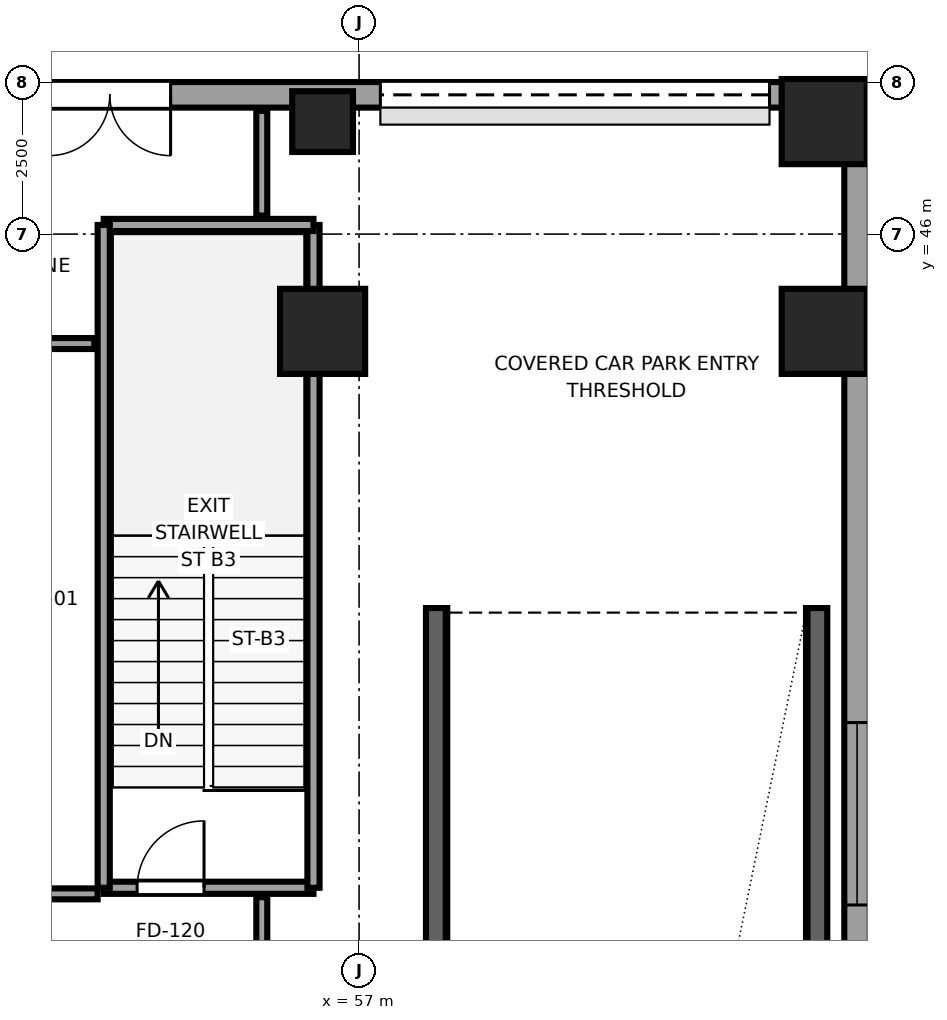
"""IFC4 building model, lengths in metres.
Left out: names, types, materials, properties, quantities, classifications, styles, units other than length and angle.
Written with IfcOpenShell. Run it as: python <this file> out.ifc"""

import sys

from ifc_helpers import new_model, si_unit, direction, frame, frame_2d, origin, origin_2d, place, context, subcontext, project, spatial, rectangle, extrude, source, transform, mapped, element, fill, save


model = new_model("IFC4")
c1 = context("Model", 3, precision=1e-05, world=origin(), true_north=direction((0.0, 1.0)))
c2 = subcontext(c1, "Body", "Model", "MODEL_VIEW")
j1 = project(units=[si_unit("LENGTHUNIT", "METRE"), si_unit("PLANEANGLEUNIT", "RADIAN")], contexts=[c1])
p1 = place(None, origin())
s1 = spatial("IfcSite", under=j1, at=p1, CompositionType="ELEMENT")
p2 = place(p1, origin())
s2 = spatial("IfcBuilding", under=s1, at=p2, CompositionType="ELEMENT")
p3 = place(p2, origin())
s3 = spatial("IfcBuildingStorey", under=s2, at=p3, CompositionType="ELEMENT", Elevation=0.0)
for number, where, z_axis, x_axis in (
    (1, (58.275, 10.85, 0.0), (0.0, 0.0, 1.0), (0.0, 1.0, 0.0)),
    (2, (64.525, 10.85, 0.0), (0.0, 0.0, 1.0), (0.0, 1.0, 0.0)),
):
    element("IfcWall", number, at=place(p3, frame(where, z_axis=z_axis, x_axis=x_axis)), inside=s3, PredefinedType="SHEAR", context=c2, shape_type="SweptSolid", body=[
        extrude(rectangle(XDim=29.0, YDim=0.35, at=frame_2d((14.5, 0.0))), origin(), (0.0, 0.0, 1.0), 1.25),
    ])
m1 = source(origin(), c2, "Body", "SweptSolid", [
    extrude(rectangle(XDim=1.4, YDim=1.4, at=origin_2d()), origin(), (0.0, 0.0, 1.0), 6.0),
])
for number, where, z_axis, x_axis in (
    (3, (64.65, 44.4, 0.0), (0.0, 0.0, 1.0), (1.0, 0.0, 0.0)),
    (4, (64.65, 47.85, 0.0), (0.0, 0.0, 1.0), (1.0, 0.0, 0.0)),
    (5, (56.4, 44.4, 0.0), (0.0, 0.0, 1.0), (1.0, 0.0, 0.0)),
):
    element("IfcColumn", number, at=place(p3, frame(where, z_axis=z_axis, x_axis=x_axis)), inside=s3, PredefinedType="COLUMN", context=c2, shape_type="MappedRepresentation", body=[
        mapped(m1, transform((0.0, 0.0, 0.0), x_axis=(1.0, 0.0, 0.0), y_axis=(0.0, 1.0, 0.0), z_axis=(0.0, 0.0, 1.0), scale=1.0)),
    ])
m2 = source(origin(), c2, "Body", "SweptSolid", [
    extrude(rectangle(XDim=1.0, YDim=1.0, at=origin_2d()), origin(), (0.0, 0.0, 1.0), 6.0),
])
p4 = place(p3, frame((56.4, 47.85, 0.0), z_axis=(0.0, 0.0, 1.0), x_axis=(1.0, 0.0, 0.0)))
e6 = element("IfcColumn", 6, at=p4, inside=s3, PredefinedType="COLUMN", context=c2, shape_type="MappedRepresentation", body=[
    mapped(m2, transform((0.0, 0.0, 0.0), x_axis=(1.0, 0.0, 0.0), y_axis=(0.0, 1.0, 0.0), z_axis=(0.0, 0.0, 1.0), scale=1.0)),
])
p5 = place(p3, frame((65.19, -2.29, 0.0), z_axis=(0.0, 0.0, 1.0), x_axis=(0.0, 1.0, 0.0)))
e7 = element("IfcWall", 7, at=p5, inside=s3, PredefinedType="SOLIDWALL", context=c2, shape_type="SweptSolid", body=[
    extrude(rectangle(XDim=50.58, YDim=0.42, at=frame_2d((25.29, 0.0))), origin(), (0.0, 0.0, 1.0), 5.74),
])
p6 = place(p5, frame((5.834, 0.0, 0.65)))
e8 = element("IfcOpeningElement", 8, at=p6, cuts=e7, PredefinedType="OPENING", context=c2, shape_type="SweptSolid", body=[
    extrude(rectangle(XDim=3.0, YDim=2.5, at=frame_2d((1.5, 1.25))), frame((0.0, 0.22, 0.0), z_axis=(0.0, -1.0, 0.0), x_axis=(1.0, 0.0, 0.0)), (0.0, 0.0, 1.0), 0.44),
])
p7 = place(p5, frame((14.262, 0.0, 0.65)))
e9 = element("IfcOpeningElement", 9, at=p7, cuts=e7, PredefinedType="OPENING", context=c2, shape_type="SweptSolid", body=[
    extrude(rectangle(XDim=3.0, YDim=2.5, at=frame_2d((1.5, 1.25))), frame((0.0, 0.22, 0.0), z_axis=(0.0, -1.0, 0.0), x_axis=(1.0, 0.0, 0.0)), (0.0, 0.0, 1.0), 0.44),
])
p8 = place(p5, frame((19.301, 0.0, 0.65)))
e10 = element("IfcOpeningElement", 10, at=p8, cuts=e7, PredefinedType="OPENING", context=c2, shape_type="SweptSolid", body=[
    extrude(rectangle(XDim=3.0, YDim=2.5, at=frame_2d((1.5, 1.25))), frame((0.0, 0.22, 0.0), z_axis=(0.0, -1.0, 0.0), x_axis=(1.0, 0.0, 0.0)), (0.0, 0.0, 1.0), 0.44),
])
p9 = place(p5, frame((22.74, 0.0, 0.65)))
e11 = element("IfcOpeningElement", 11, at=p9, cuts=e7, PredefinedType="OPENING", context=c2, shape_type="SweptSolid", body=[
    extrude(rectangle(XDim=3.0, YDim=2.5, at=frame_2d((1.5, 1.25))), frame((0.0, 0.22, 0.0), z_axis=(0.0, -1.0, 0.0), x_axis=(1.0, 0.0, 0.0)), (0.0, 0.0, 1.0), 0.44),
])
p10 = place(p5, frame((28.279, 0.0, 0.65)))
e12 = element("IfcOpeningElement", 12, at=p10, cuts=e7, PredefinedType="OPENING", context=c2, shape_type="SweptSolid", body=[
    extrude(rectangle(XDim=3.0, YDim=2.5, at=frame_2d((1.5, 1.25))), frame((0.0, 0.22, 0.0), z_axis=(0.0, -1.0, 0.0), x_axis=(1.0, 0.0, 0.0)), (0.0, 0.0, 1.0), 0.44),
])
p11 = place(p5, frame((37.257, 0.0, 0.65)))
e13 = element("IfcOpeningElement", 13, at=p11, cuts=e7, PredefinedType="OPENING", context=c2, shape_type="SweptSolid", body=[
    extrude(rectangle(XDim=3.0, YDim=2.5, at=frame_2d((1.5, 1.25))), frame((0.0, 0.22, 0.0), z_axis=(0.0, -1.0, 0.0), x_axis=(1.0, 0.0, 0.0)), (0.0, 0.0, 1.0), 0.44),
])
p12 = place(p3, frame((65.19, 48.29, 0.0), z_axis=(0.0, 0.0, 1.0), x_axis=(-1.0, 0.0, 0.0)))
e14 = element("IfcWall", 14, at=p12, inside=s3, PredefinedType="SOLIDWALL", context=c2, shape_type="SweptSolid", body=[
    extrude(rectangle(XDim=73.38, YDim=0.42, at=frame_2d((36.69, 0.0))), origin(), (0.0, 0.0, 1.0), 5.74),
])
p13 = place(p12, frame((7.84, 0.0, 0.0), z_axis=(0.0, 0.0, 1.0), x_axis=(-1.0, 0.0, 0.0)))
e15 = element("IfcOpeningElement", 15, at=p13, cuts=e14, PredefinedType="OPENING", context=c2, shape_type="SweptSolid", body=[
    extrude(rectangle(XDim=6.4, YDim=3.2, at=frame_2d((3.2, 1.6))), frame((0.0, 0.22, 0.0), z_axis=(0.0, -1.0, 0.0), x_axis=(1.0, 0.0, 0.0)), (0.0, 0.0, 1.0), 0.44),
])
p14 = place(p12, frame((13.29, 0.0, 0.0), z_axis=(0.0, 0.0, 1.0), x_axis=(-1.0, 0.0, 0.0)))
e16 = element("IfcOpeningElement", 16, at=p14, cuts=e14, PredefinedType="OPENING", context=c2, shape_type="SweptSolid", body=[
    extrude(rectangle(XDim=2.0, YDim=2.25, at=frame_2d((1.0, 1.125))), frame((0.0, 0.22, 0.0), z_axis=(0.0, -1.0, 0.0), x_axis=(1.0, 0.0, 0.0)), (0.0, 0.0, 1.0), 0.44),
])
p15 = place(p12, frame((20.59, 0.0, 0.0), z_axis=(0.0, 0.0, 1.0), x_axis=(-1.0, 0.0, 0.0)))
e17 = element("IfcOpeningElement", 17, at=p15, cuts=e14, PredefinedType="OPENING", context=c2, shape_type="SweptSolid", body=[
    extrude(rectangle(XDim=2.0, YDim=2.25, at=frame_2d((1.0, 1.125))), frame((0.0, 0.22, 0.0), z_axis=(0.0, -1.0, 0.0), x_axis=(1.0, 0.0, 0.0)), (0.0, 0.0, 1.0), 0.44),
])
p16 = place(p12, frame((51.99, 0.0, 0.0), z_axis=(0.0, 0.0, 1.0), x_axis=(-1.0, 0.0, 0.0)))
e18 = element("IfcOpeningElement", 18, at=p16, cuts=e14, PredefinedType="OPENING", context=c2, shape_type="SweptSolid", body=[
    extrude(rectangle(XDim=2.0, YDim=2.25, at=frame_2d((1.0, 1.125))), frame((0.0, 0.22, 0.0), z_axis=(0.0, -1.0, 0.0), x_axis=(1.0, 0.0, 0.0)), (0.0, 0.0, 1.0), 0.44),
])
p17 = place(p12, frame((69.99, 0.0, 0.0), z_axis=(0.0, 0.0, 1.0), x_axis=(-1.0, 0.0, 0.0)))
e19 = element("IfcOpeningElement", 19, at=p17, cuts=e14, PredefinedType="OPENING", context=c2, shape_type="SweptSolid", body=[
    extrude(rectangle(XDim=2.0, YDim=2.25, at=frame_2d((1.0, 1.125))), frame((0.0, 0.22, 0.0), z_axis=(0.0, -1.0, 0.0), x_axis=(1.0, 0.0, 0.0)), (0.0, 0.0, 1.0), 0.44),
])
p18 = place(p12, frame((24.462, 0.0, 0.65)))
e20 = element("IfcOpeningElement", 20, at=p18, cuts=e14, PredefinedType="OPENING", context=c2, shape_type="SweptSolid", body=[
    extrude(rectangle(XDim=3.0, YDim=2.5, at=frame_2d((1.5, 1.25))), frame((0.0, 0.22, 0.0), z_axis=(0.0, -1.0, 0.0), x_axis=(1.0, 0.0, 0.0)), (0.0, 0.0, 1.0), 0.44),
])
p19 = place(p12, frame((28.423, 0.0, 0.65)))
e21 = element("IfcOpeningElement", 21, at=p19, cuts=e14, PredefinedType="OPENING", context=c2, shape_type="SweptSolid", body=[
    extrude(rectangle(XDim=3.0, YDim=2.5, at=frame_2d((1.5, 1.25))), frame((0.0, 0.22, 0.0), z_axis=(0.0, -1.0, 0.0), x_axis=(1.0, 0.0, 0.0)), (0.0, 0.0, 1.0), 0.44),
])
p20 = place(p12, frame((32.934, 0.0, 0.65)))
e22 = element("IfcOpeningElement", 22, at=p20, cuts=e14, PredefinedType="OPENING", context=c2, shape_type="SweptSolid", body=[
    extrude(rectangle(XDim=3.0, YDim=2.5, at=frame_2d((1.5, 1.25))), frame((0.0, 0.22, 0.0), z_axis=(0.0, -1.0, 0.0), x_axis=(1.0, 0.0, 0.0)), (0.0, 0.0, 1.0), 0.44),
])
p21 = place(p12, frame((37.446, 0.0, 0.65)))
e23 = element("IfcOpeningElement", 23, at=p21, cuts=e14, PredefinedType="OPENING", context=c2, shape_type="SweptSolid", body=[
    extrude(rectangle(XDim=3.0, YDim=2.5, at=frame_2d((1.5, 1.25))), frame((0.0, 0.22, 0.0), z_axis=(0.0, -1.0, 0.0), x_axis=(1.0, 0.0, 0.0)), (0.0, 0.0, 1.0), 0.44),
])
p22 = place(p12, frame((41.957, 0.0, 0.65)))
e24 = element("IfcOpeningElement", 24, at=p22, cuts=e14, PredefinedType="OPENING", context=c2, shape_type="SweptSolid", body=[
    extrude(rectangle(XDim=3.0, YDim=2.5, at=frame_2d((1.5, 1.25))), frame((0.0, 0.22, 0.0), z_axis=(0.0, -1.0, 0.0), x_axis=(1.0, 0.0, 0.0)), (0.0, 0.0, 1.0), 0.44),
])
p23 = place(p3, frame((52.8, 35.25, 0.0), z_axis=(0.0, 0.0, 1.0), x_axis=(1.0, 0.0, 0.0)))
e25 = element("IfcWall", 25, at=p23, inside=s3, PredefinedType="SOLIDWALL", context=c2, shape_type="SweptSolid", body=[
    extrude(rectangle(XDim=3.45, YDim=0.2, at=frame_2d((1.725, 0.0))), origin(), (0.0, 0.0, 1.0), 5.74),
])
p24 = place(p23, frame((1.65, 0.0, 0.0), z_axis=(0.0, 0.0, 1.0), x_axis=(-1.0, 0.0, 0.0)))
e26 = element("IfcOpeningElement", 26, at=p24, cuts=e25, PredefinedType="OPENING", context=c2, shape_type="SweptSolid", body=[
    extrude(rectangle(XDim=1.1, YDim=2.12, at=frame_2d((0.55, 1.06))), frame((0.0, 0.11, 0.0), z_axis=(0.0, -1.0, 0.0), x_axis=(1.0, 0.0, 0.0)), (0.0, 0.0, 1.0), 0.22),
])
p25 = place(p3, frame((56.25, 35.25, 0.0), z_axis=(0.0, 0.0, 1.0), x_axis=(0.0, 1.0, 0.0)))
e27 = element("IfcWall", 27, at=p25, inside=s3, PredefinedType="SOLIDWALL", context=c2, shape_type="SweptSolid", body=[
    extrude(rectangle(XDim=10.9, YDim=0.2, at=frame_2d((5.45, 0.0))), origin(), (0.0, 0.0, 1.0), 4.914),
])
p26 = place(p3, frame((56.25, 46.15, 0.0), z_axis=(0.0, 0.0, 1.0), x_axis=(-1.0, 0.0, 0.0)))
e28 = element("IfcWall", 28, at=p26, inside=s3, PredefinedType="SOLIDWALL", context=c2, shape_type="SweptSolid", body=[
    extrude(rectangle(XDim=3.45, YDim=0.2, at=frame_2d((1.725, 0.0))), origin(), (0.0, 0.0, 1.0), 5.74),
])
p27 = place(p3, frame((52.8, 46.15, 0.0), z_axis=(0.0, 0.0, 1.0), x_axis=(0.0, -1.0, 0.0)))
e29 = element("IfcWall", 29, at=p27, inside=s3, PredefinedType="SOLIDWALL", context=c2, shape_type="SweptSolid", body=[
    extrude(rectangle(XDim=10.9, YDim=0.2, at=frame_2d((5.45, 0.0))), origin(), (0.0, 0.0, 1.0), 5.74),
])
p28 = place(p3, frame((55.4, 33.15, 0.0), z_axis=(0.0, 0.0, 1.0), x_axis=(0.0, 1.0, 0.0)))
e30 = element("IfcWall", 30, at=p28, inside=s3, PredefinedType="PARTITIONING", context=c2, shape_type="SweptSolid", body=[
    extrude(rectangle(XDim=1.945, YDim=0.18, at=frame_2d((0.973, 0.0))), origin(), (0.0, 0.0, 1.0), 5.74),
])
p29 = place(p3, frame((50.8, 35.15, 0.0), z_axis=(0.0, 0.0, 1.0), x_axis=(1.0, 0.0, 0.0)))
e31 = element("IfcWall", 31, at=p29, inside=s3, PredefinedType="PARTITIONING", context=c2, shape_type="SweptSolid", body=[
    extrude(rectangle(XDim=1.9, YDim=0.18, at=frame_2d((0.95, 0.0))), origin(), (0.0, 0.0, 1.0), 5.74),
])
p30 = place(p3, frame((50.8, 44.2, 0.0), z_axis=(0.0, 0.0, 1.0), x_axis=(1.0, 0.0, 0.0)))
e32 = element("IfcWall", 32, at=p30, inside=s3, PredefinedType="PARTITIONING", context=c2, shape_type="SweptSolid", body=[
    extrude(rectangle(XDim=1.845, YDim=0.18, at=frame_2d((0.922, 0.0))), origin(), (0.0, 0.0, 1.0), 4.914),
])
p31 = place(p3, frame((55.4, 46.305, 0.0), z_axis=(0.0, 0.0, 1.0), x_axis=(0.0, 1.0, 0.0)))
e33 = element("IfcWall", 33, at=p31, inside=s3, PredefinedType="PARTITIONING", context=c2, shape_type="SweptSolid", body=[
    extrude(rectangle(XDim=1.72, YDim=0.18, at=frame_2d((0.86, 0.0))), origin(), (0.0, 0.0, 1.0), 5.74),
])
m3 = source(origin(), c2, "Body", "SweptSolid", [
    extrude(rectangle(XDim=3.0, YDim=2.5, at=frame_2d((1.5, 1.25))), frame((0.0, 0.09, 0.0), z_axis=(0.0, -1.0, 0.0), x_axis=(1.0, 0.0, 0.0)), (0.0, 0.0, 1.0), 0.06),
])
p32 = place(p11, origin())
e34 = element("IfcWindow", 34, at=p32, inside=s3, PartitioningType="TRIPLE_PANEL_HORIZONTAL", PredefinedType="WINDOW", context=c2, shape_type="MappedRepresentation", body=[
    mapped(m3, transform((0.0, 0.0, 0.0), x_axis=(1.0, 0.0, 0.0), y_axis=(0.0, 1.0, 0.0), z_axis=(0.0, 0.0, 1.0), scale=1.0)),
])
fill(e13, e34)
m4 = source(origin(), c2, "Body", "SweptSolid", [
    extrude(rectangle(XDim=6.4, YDim=3.2, at=frame_2d((3.2, 1.6))), frame((0.0, 0.025, 0.0), z_axis=(0.0, -1.0, 0.0), x_axis=(1.0, 0.0, 0.0)), (0.0, 0.0, 1.0), 0.05),
])
p33 = place(p13, origin())
e35 = element("IfcDoor", 35, at=p33, inside=s3, OperationType="ROLLINGUP", PredefinedType="GATE", context=c2, shape_type="MappedRepresentation", body=[
    mapped(m4, transform((0.0, 0.0, 0.0), x_axis=(1.0, 0.0, 0.0), y_axis=(0.0, 1.0, 0.0), z_axis=(0.0, 0.0, 1.0), scale=1.0)),
])
fill(e15, e35)
m5 = source(origin(), c2, "Body", "SweptSolid", [
    extrude(rectangle(XDim=2.0, YDim=2.25, at=frame_2d((1.0, 1.125))), frame((0.0, 0.025, 0.0), z_axis=(0.0, -1.0, 0.0), x_axis=(1.0, 0.0, 0.0)), (0.0, 0.0, 1.0), 0.05),
])
p34 = place(p14, origin())
e36 = element("IfcDoor", 36, at=p34, inside=s3, OperationType="DOUBLE_DOOR_SINGLE_SWING", PredefinedType="DOOR", context=c2, shape_type="MappedRepresentation", body=[
    mapped(m5, transform((0.0, 0.0, 0.0), x_axis=(1.0, 0.0, 0.0), y_axis=(0.0, 1.0, 0.0), z_axis=(0.0, 0.0, 1.0), scale=1.0)),
])
fill(e16, e36)
m6 = source(origin(), c2, "Body", "SweptSolid", [
    extrude(rectangle(XDim=1.1, YDim=2.12, at=frame_2d((0.55, 1.06))), frame((0.0, 0.025, 0.0), z_axis=(0.0, -1.0, 0.0), x_axis=(1.0, 0.0, 0.0)), (0.0, 0.0, 1.0), 0.05),
])
p35 = place(p24, origin())
e37 = element("IfcDoor", 37, at=p35, inside=s3, OperationType="SINGLE_SWING_RIGHT", PredefinedType="DOOR", context=c2, shape_type="MappedRepresentation", body=[
    mapped(m6, transform((0.0, 0.0, 0.0), x_axis=(1.0, 0.0, 0.0), y_axis=(0.0, 1.0, 0.0), z_axis=(0.0, 0.0, 1.0), scale=1.0)),
])
fill(e26, e37)
save(model, sys.argv[1])
